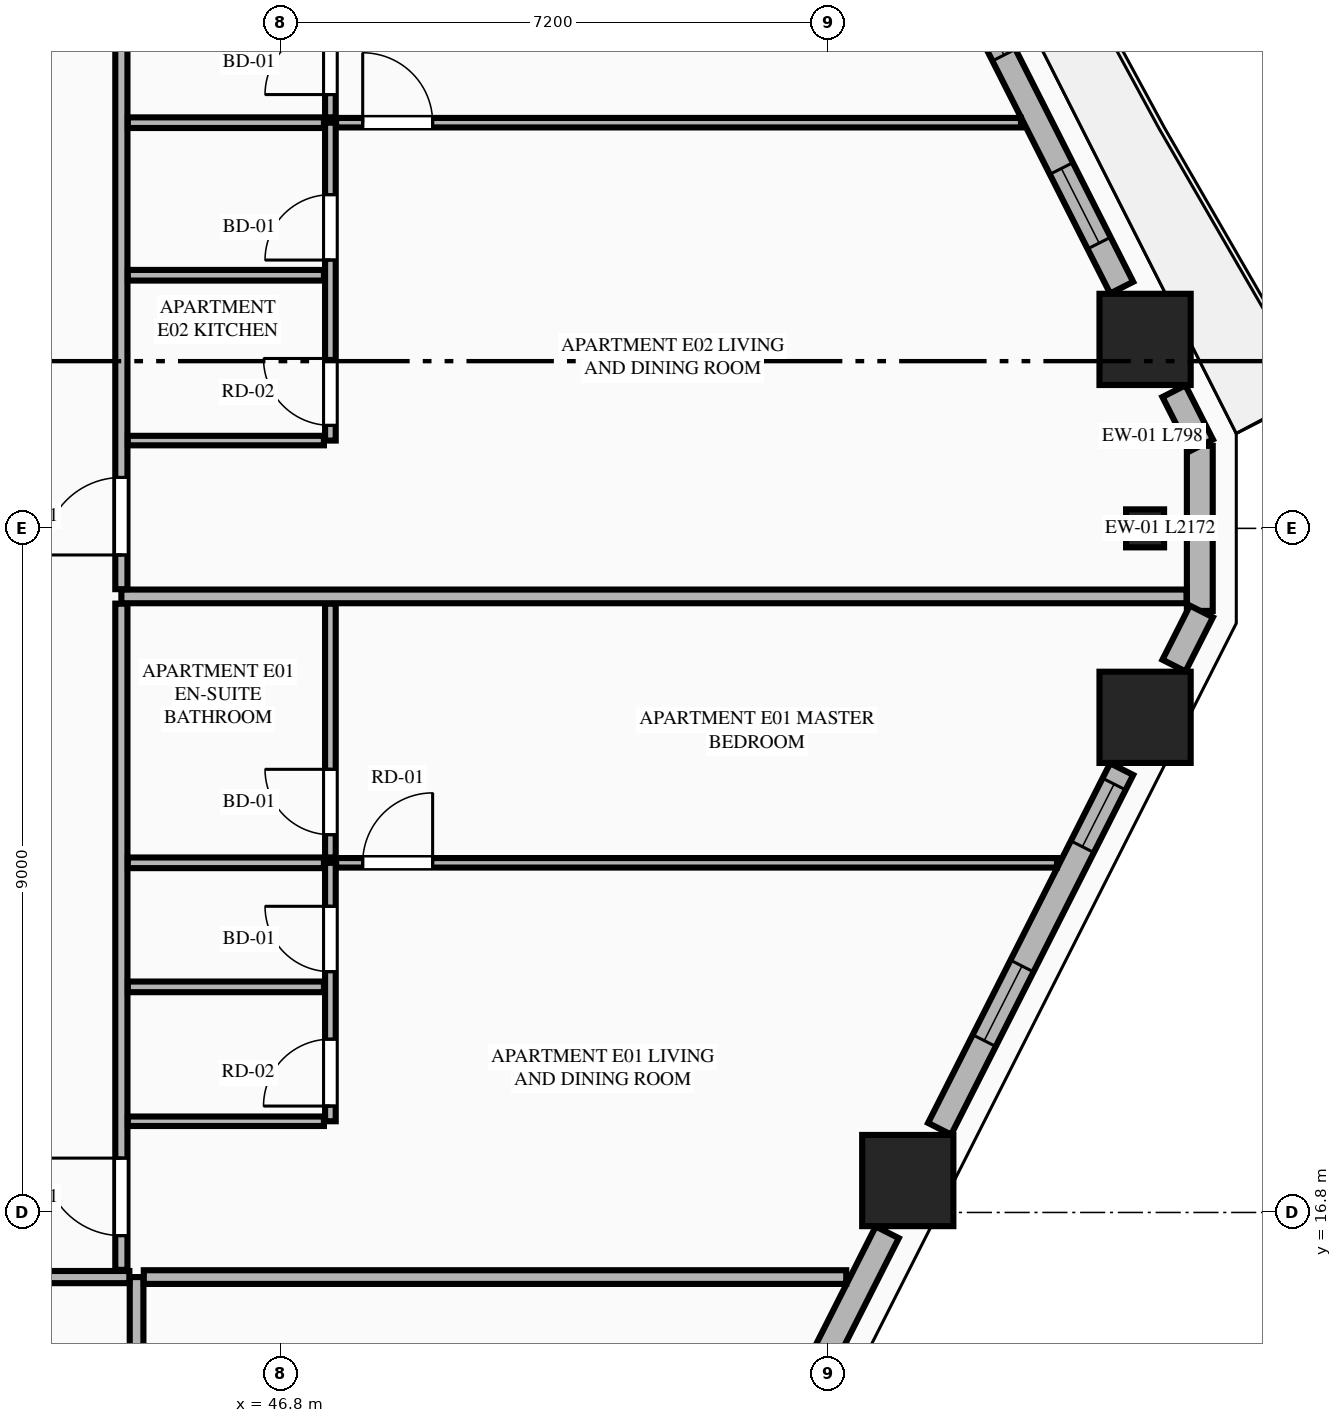
"""IFC4 building model, lengths in metres.
Left out: names, types, materials, properties, quantities, classifications, styles, units other than length and angle.
Written with IfcOpenShell. Run it as: python <this file> out.ifc"""

import sys

from ifc_helpers import new_model, si_unit, direction, frame, frame_2d, origin, origin_2d, place, context, subcontext, project, spatial, rectangle, extrude, element, fill, save


model = new_model("IFC4")
c1 = context("Model", 3, precision=1e-05, world=origin(), true_north=direction((0.0, 1.0)))
c2 = subcontext(c1, "Body", "Model", "MODEL_VIEW")
j1 = project(units=[si_unit("LENGTHUNIT", "METRE"), si_unit("PLANEANGLEUNIT", "RADIAN")], contexts=[c1])
p1 = place(None, origin())
s1 = spatial("IfcSite", under=j1, at=p1, CompositionType="ELEMENT")
p2 = place(p1, origin())
s2 = spatial("IfcBuilding", under=s1, at=p2, CompositionType="ELEMENT")
p3 = place(p2, frame((0.0, 0.0, 67.5)))
s3 = spatial("IfcBuildingStorey", under=s2, at=p3, CompositionType="ELEMENT", Elevation=67.5)
for number, where, z_axis, x_axis in (
    (1, (55.046, 17.22, 0.0), (0.0, 0.0, 1.0), (1.0, 0.0, 0.0)),
    (2, (58.168, 23.314, 0.0), (0.0, 0.0, 1.0), (1.0, 0.0, 0.0)),
    (3, (58.168, 28.286, 0.0), (0.0, 0.0, 1.0), (1.0, 0.0, 0.0)),
):
    element("IfcColumn", number, at=place(p3, frame(where, z_axis=z_axis, x_axis=x_axis)), inside=s3, PredefinedType="COLUMN", context=c2, shape_type="SweptSolid", body=[
        extrude(rectangle(XDim=1.2, YDim=1.2, at=origin_2d()), origin(), (0.0, 0.0, 1.0), 3.55),
    ])
p4 = place(p3, frame((58.168, 25.8, 0.0), z_axis=(0.0, 0.0, 1.0), x_axis=(0.0, 1.0, 0.0)))
e4 = element("IfcColumn", 4, at=p4, inside=s3, PredefinedType="PILASTER", context=c2, shape_type="SweptSolid", body=[
    extrude(rectangle(XDim=0.5, YDim=0.35, at=origin_2d()), origin(), (0.0, 0.0, 1.0), 3.55),
])
p5 = place(p3, frame((58.888, 24.714, 0.0), z_axis=(0.0, 0.0, 1.0), x_axis=(0.0, 1.0, 0.0)))
e5 = element("IfcWall", 5, at=p5, inside=s3, PredefinedType="STANDARD", context=c2, shape_type="SweptSolid", body=[
    extrude(rectangle(XDim=2.172, YDim=0.34, at=frame_2d((1.086, 0.0))), origin(), (0.0, 0.0, 1.0), 3.33),
])
p6 = place(p3, frame((52.271, 11.59, 0.0), z_axis=(0.0, 0.0, 1.0), x_axis=(0.451592100298, 0.892224509273, 0.0)))
e6 = element("IfcWall", 6, at=p6, inside=s3, PredefinedType="STANDARD", context=c2, shape_type="SweptSolid", body=[
    extrude(rectangle(XDim=5.547, YDim=0.34, at=frame_2d((2.773, 0.0))), origin(), (0.0, 0.0, 1.0), 2.787),
])
p7 = place(p6, frame((2.223, 0.0, 0.75)))
e7 = element("IfcOpeningElement", 7, at=p7, cuts=e6, PredefinedType="OPENING", context=c2, shape_type="SweptSolid", body=[
    extrude(rectangle(XDim=1.1, YDim=1.887, at=frame_2d((0.55, 0.943))), frame((0.0, 0.18, 0.0), z_axis=(0.0, -1.0, 0.0), x_axis=(1.0, 0.0, 0.0)), (0.0, 0.0, 1.0), 0.36),
])
p8 = place(p3, frame((55.465, 17.901, 0.0), z_axis=(0.0, 0.0, 1.0), x_axis=(0.451572088722, 0.892234637686, 0.0)))
e8 = element("IfcWall", 8, at=p8, inside=s3, PredefinedType="STANDARD", context=c2, shape_type="SweptSolid", body=[
    extrude(rectangle(XDim=5.304, YDim=0.34, at=frame_2d((2.652, 0.0))), origin(), (0.0, 0.0, 1.0), 2.787),
])
p9 = place(p8, frame((1.3, 0.0, 0.75)))
e9 = element("IfcOpeningElement", 9, at=p9, cuts=e8, PredefinedType="OPENING", context=c2, shape_type="SweptSolid", body=[
    extrude(rectangle(XDim=1.1, YDim=1.887, at=frame_2d((0.55, 0.943))), frame((0.0, 0.18, 0.0), z_axis=(0.0, -1.0, 0.0), x_axis=(1.0, 0.0, 0.0)), (0.0, 0.0, 1.0), 0.36),
])
p10 = place(p8, frame((4.159, 0.0, 0.75)))
e10 = element("IfcOpeningElement", 10, at=p10, cuts=e8, PredefinedType="OPENING", context=c2, shape_type="SweptSolid", body=[
    extrude(rectangle(XDim=0.924, YDim=1.887, at=frame_2d((0.462, 0.943))), frame((0.0, 0.18, 0.0), z_axis=(0.0, -1.0, 0.0), x_axis=(1.0, 0.0, 0.0)), (0.0, 0.0, 1.0), 0.36),
])
for number, where, z_axis, x_axis in (
    (11, (58.548, 23.995, 0.0), (0.0, 0.0, 1.0), (0.452, 0.892, 0.0)),
    (12, (58.909, 26.893, 0.0), (0.0, 0.0, 1.0), (-0.452, 0.892, 0.0)),
):
    element("IfcWall", number, at=place(p3, frame(where, z_axis=z_axis, x_axis=x_axis)), inside=s3, PredefinedType="STANDARD", context=c2, shape_type="SweptSolid", body=[
        extrude(rectangle(XDim=0.798, YDim=0.34, at=frame_2d((0.399, 0.0))), origin(), (0.0, 0.0, 1.0), 3.33),
    ])
p11 = place(p3, frame((57.86, 28.967, 0.0), z_axis=(0.0, 0.0, 1.0), x_axis=(-0.451590635984, 0.892225250422, 0.0)))
e13 = element("IfcWall", 13, at=p11, inside=s3, PredefinedType="STANDARD", context=c2, shape_type="SweptSolid", body=[
    extrude(rectangle(XDim=5.303, YDim=0.34, at=frame_2d((2.652, 0.0))), origin(), (0.0, 0.0, 1.0), 2.787),
])
p12 = place(p11, frame((0.657, 0.0, 0.75)))
e14 = element("IfcOpeningElement", 14, at=p12, cuts=e13, PredefinedType="OPENING", context=c2, shape_type="SweptSolid", body=[
    extrude(rectangle(XDim=1.1, YDim=1.887, at=frame_2d((0.55, 0.943))), frame((0.0, 0.18, 0.0), z_axis=(0.0, -1.0, 0.0), x_axis=(1.0, 0.0, 0.0)), (0.0, 0.0, 1.0), 0.36),
])
p13 = place(p11, frame((3.429, 0.0, 0.75)))
e15 = element("IfcOpeningElement", 15, at=p13, cuts=e13, PredefinedType="OPENING", context=c2, shape_type="SweptSolid", body=[
    extrude(rectangle(XDim=1.1, YDim=1.887, at=frame_2d((0.55, 0.943))), frame((0.0, 0.18, 0.0), z_axis=(0.0, -1.0, 0.0), x_axis=(1.0, 0.0, 0.0)), (0.0, 0.0, 1.0), 0.36),
])
p14 = place(p3, frame((44.9, 2.455, 0.0), z_axis=(0.0, 0.0, 1.0), x_axis=(0.0, 1.0, 0.0)))
e16 = element("IfcWall", 16, at=p14, inside=s3, PredefinedType="PARTITIONING", context=c2, shape_type="SweptSolid", body=[
    extrude(rectangle(XDim=13.495, YDim=0.18, at=frame_2d((6.748, 0.0))), origin(), (0.0, 0.0, 1.0), 3.33),
])
p15 = place(p3, frame((19.995, 15.95, 0.0), z_axis=(0.0, 0.0, 1.0), x_axis=(1.0, 0.0, 0.0)))
e17 = element("IfcWall", 17, at=p15, inside=s3, PredefinedType="PARTITIONING", context=c2, shape_type="SweptSolid", body=[
    extrude(rectangle(XDim=24.81, YDim=0.16, at=frame_2d((12.405, 0.0))), origin(), (0.0, 0.0, 1.0), 3.33),
])
p16 = place(p15, frame((0.705, 0.0, 0.0)))
e18 = element("IfcOpeningElement", 18, at=p16, cuts=e17, PredefinedType="OPENING", context=c2, shape_type="SweptSolid", body=[
    extrude(rectangle(XDim=1.35, YDim=2.35, at=frame_2d((0.675, 1.175))), frame((0.0, 0.09, 0.0), z_axis=(0.0, -1.0, 0.0), x_axis=(1.0, 0.0, 0.0)), (0.0, 0.0, 1.0), 0.18),
])
p17 = place(p3, frame((44.995, 15.95, 0.0), z_axis=(0.0, 0.0, 1.0), x_axis=(1.0, 0.0, 0.0)))
e19 = element("IfcWall", 19, at=p17, inside=s3, PredefinedType="PARTITIONING", context=c2, shape_type="SweptSolid", body=[
    extrude(rectangle(XDim=9.241, YDim=0.18, at=frame_2d((4.621, 0.0))), origin(), (0.0, 0.0, 1.0), 3.33),
])
p18 = place(p3, frame((44.7, 16.045, 0.0), z_axis=(0.0, 0.0, 1.0), x_axis=(0.0, 1.0, 0.0)))
e20 = element("IfcWall", 20, at=p18, inside=s3, PredefinedType="PARTITIONING", context=c2, shape_type="SweptSolid", body=[
    extrude(rectangle(XDim=8.765, YDim=0.16, at=frame_2d((4.383, 0.0))), origin(), (0.0, 0.0, 1.0), 3.33),
])
p19 = place(p18, frame((0.45, 0.0, 0.0)))
e21 = element("IfcOpeningElement", 21, at=p19, cuts=e20, PredefinedType="OPENING", context=c2, shape_type="SweptSolid", body=[
    extrude(rectangle(XDim=1.02, YDim=2.25, at=frame_2d((0.51, 1.125))), frame((0.0, 0.09, 0.0), z_axis=(0.0, -1.0, 0.0), x_axis=(1.0, 0.0, 0.0)), (0.0, 0.0, 1.0), 0.18),
])
p20 = place(p3, frame((44.785, 18.0, 0.0), z_axis=(0.0, 0.0, 1.0), x_axis=(1.0, 0.0, 0.0)))
e22 = element("IfcWall", 22, at=p20, inside=s3, PredefinedType="PARTITIONING", context=c2, shape_type="SweptSolid", body=[
    extrude(rectangle(XDim=2.58, YDim=0.125, at=frame_2d((1.29, 0.0))), origin(), (0.0, 0.0, 1.0), 2.636),
])
p21 = place(p3, frame((47.45, 18.0, 0.0), z_axis=(0.0, 0.0, 1.0), x_axis=(0.0, 1.0, 0.0)))
e23 = element("IfcWall", 23, at=p21, inside=s3, PredefinedType="PLUMBINGWALL", context=c2, shape_type="SweptSolid", body=[
    extrude(rectangle(XDim=3.4, YDim=0.14, at=frame_2d((1.7, 0.0))), origin(), (0.0, 0.0, 1.0), 3.33),
])
p22 = place(p21, frame((0.2, 0.0, 0.0)))
e24 = element("IfcOpeningElement", 24, at=p22, cuts=e23, PredefinedType="OPENING", context=c2, shape_type="SweptSolid", body=[
    extrude(rectangle(XDim=0.88, YDim=2.15, at=frame_2d((0.44, 1.075))), frame((0.0, 0.08, 0.0), z_axis=(0.0, -1.0, 0.0), x_axis=(1.0, 0.0, 0.0)), (0.0, 0.0, 1.0), 0.16),
])
p23 = place(p21, frame((1.968, 0.0, 0.0)))
e25 = element("IfcOpeningElement", 25, at=p23, cuts=e23, PredefinedType="OPENING", context=c2, shape_type="SweptSolid", body=[
    extrude(rectangle(XDim=0.86, YDim=2.1, at=frame_2d((0.43, 1.05))), frame((0.0, 0.08, 0.0), z_axis=(0.0, -1.0, 0.0), x_axis=(1.0, 0.0, 0.0)), (0.0, 0.0, 1.0), 0.16),
])
p24 = place(p3, frame((47.45, 21.47, 0.0), z_axis=(0.0, 0.0, 1.0), x_axis=(0.0, 1.0, 0.0)))
e26 = element("IfcWall", 26, at=p24, inside=s3, PredefinedType="PLUMBINGWALL", context=c2, shape_type="SweptSolid", body=[
    extrude(rectangle(XDim=3.34, YDim=0.14, at=frame_2d((1.67, 0.0))), origin(), (0.0, 0.0, 1.0), 3.33),
])
p25 = place(p24, frame((0.3, 0.0, 0.0)))
e27 = element("IfcOpeningElement", 27, at=p25, cuts=e26, PredefinedType="OPENING", context=c2, shape_type="SweptSolid", body=[
    extrude(rectangle(XDim=0.86, YDim=2.1, at=frame_2d((0.43, 1.05))), frame((0.0, 0.08, 0.0), z_axis=(0.0, -1.0, 0.0), x_axis=(1.0, 0.0, 0.0)), (0.0, 0.0, 1.0), 0.16),
])
p26 = place(p3, frame((44.785, 21.4, 0.0), z_axis=(0.0, 0.0, 1.0), x_axis=(1.0, 0.0, 0.0)))
e28 = element("IfcWall", 28, at=p26, inside=s3, PredefinedType="PLUMBINGWALL", context=c2, shape_type="SweptSolid", body=[
    extrude(rectangle(XDim=2.58, YDim=0.14, at=frame_2d((1.29, 0.0))), origin(), (0.0, 0.0, 1.0), 3.33),
])
p27 = place(p3, frame((47.525, 21.4, 0.0), z_axis=(0.0, 0.0, 1.0), x_axis=(1.0, 0.0, 0.0)))
e29 = element("IfcWall", 29, at=p27, inside=s3, PredefinedType="PARTITIONING", context=c2, shape_type="SweptSolid", body=[
    extrude(rectangle(XDim=9.484, YDim=0.125, at=frame_2d((4.742, 0.0))), origin(), (0.0, 0.0, 1.0), 3.33),
])
p28 = place(p27, frame((0.35, 0.0, 0.0)))
e30 = element("IfcOpeningElement", 30, at=p28, cuts=e29, PredefinedType="OPENING", context=c2, shape_type="SweptSolid", body=[
    extrude(rectangle(XDim=0.92, YDim=2.15, at=frame_2d((0.46, 1.075))), frame((0.0, 0.073, 0.0), z_axis=(0.0, -1.0, 0.0), x_axis=(1.0, 0.0, 0.0)), (0.0, 0.0, 1.0), 0.145),
])
p29 = place(p3, frame((44.785, 19.768, 0.0), z_axis=(0.0, 0.0, 1.0), x_axis=(1.0, 0.0, 0.0)))
e31 = element("IfcWall", 31, at=p29, inside=s3, PredefinedType="PLUMBINGWALL", context=c2, shape_type="SweptSolid", body=[
    extrude(rectangle(XDim=2.58, YDim=0.14, at=frame_2d((1.29, 0.0))), origin(), (0.0, 0.0, 1.0), 3.33),
])
p30 = place(p3, frame((44.7, 24.905, 0.0), z_axis=(0.0, 0.0, 1.0), x_axis=(1.0, 0.0, 0.0)))
e32 = element("IfcWall", 32, at=p30, inside=s3, PredefinedType="PARTITIONING", context=c2, shape_type="SweptSolid", body=[
    extrude(rectangle(XDim=14.013, YDim=0.18, at=frame_2d((7.006, 0.0))), origin(), (0.0, 0.0, 1.0), 3.33),
])
p31 = place(p3, frame((44.7, 25.0, 0.0), z_axis=(0.0, 0.0, 1.0), x_axis=(0.0, 1.0, 0.0)))
e33 = element("IfcWall", 33, at=p31, inside=s3, PredefinedType="PARTITIONING", context=c2, shape_type="SweptSolid", body=[
    extrude(rectangle(XDim=10.755, YDim=0.16, at=frame_2d((5.377, 0.0))), origin(), (0.0, 0.0, 1.0), 3.33),
])
p32 = place(p31, frame((0.45, 0.0, 0.0)))
e34 = element("IfcOpeningElement", 34, at=p32, cuts=e33, PredefinedType="OPENING", context=c2, shape_type="SweptSolid", body=[
    extrude(rectangle(XDim=1.02, YDim=2.25, at=frame_2d((0.51, 1.125))), frame((0.0, 0.09, 0.0), z_axis=(0.0, -1.0, 0.0), x_axis=(1.0, 0.0, 0.0)), (0.0, 0.0, 1.0), 0.18),
])
p33 = place(p3, frame((44.785, 26.955, 0.0), z_axis=(0.0, 0.0, 1.0), x_axis=(1.0, 0.0, 0.0)))
e35 = element("IfcWall", 35, at=p33, inside=s3, PredefinedType="PARTITIONING", context=c2, shape_type="SweptSolid", body=[
    extrude(rectangle(XDim=2.58, YDim=0.125, at=frame_2d((1.29, 0.0))), origin(), (0.0, 0.0, 1.0), 3.33),
])
p34 = place(p3, frame((47.45, 26.955, 0.0), z_axis=(0.0, 0.0, 1.0), x_axis=(0.0, 1.0, 0.0)))
e36 = element("IfcWall", 36, at=p34, inside=s3, PredefinedType="PLUMBINGWALL", context=c2, shape_type="SweptSolid", body=[
    extrude(rectangle(XDim=4.182, YDim=0.14, at=frame_2d((2.091, 0.0))), origin(), (0.0, 0.0, 1.0), 3.33),
])
p35 = place(p34, frame((0.2, 0.0, 0.0)))
e37 = element("IfcOpeningElement", 37, at=p35, cuts=e36, PredefinedType="OPENING", context=c2, shape_type="SweptSolid", body=[
    extrude(rectangle(XDim=0.88, YDim=2.15, at=frame_2d((0.44, 1.075))), frame((0.0, 0.08, 0.0), z_axis=(0.0, -1.0, 0.0), x_axis=(1.0, 0.0, 0.0)), (0.0, 0.0, 1.0), 0.16),
])
p36 = place(p34, frame((2.375, 0.0, 0.0)))
e38 = element("IfcOpeningElement", 38, at=p36, cuts=e36, PredefinedType="OPENING", context=c2, shape_type="SweptSolid", body=[
    extrude(rectangle(XDim=0.86, YDim=2.1, at=frame_2d((0.43, 1.05))), frame((0.0, 0.08, 0.0), z_axis=(0.0, -1.0, 0.0), x_axis=(1.0, 0.0, 0.0)), (0.0, 0.0, 1.0), 0.16),
])
p37 = place(p3, frame((47.45, 31.207, 0.0), z_axis=(0.0, 0.0, 1.0), x_axis=(0.0, 1.0, 0.0)))
e39 = element("IfcWall", 39, at=p37, inside=s3, PredefinedType="PLUMBINGWALL", context=c2, shape_type="SweptSolid", body=[
    extrude(rectangle(XDim=4.548, YDim=0.14, at=frame_2d((2.274, 0.0))), origin(), (0.0, 0.0, 1.0), 3.33),
])
p38 = place(p37, frame((0.3, 0.0, 0.0)))
e40 = element("IfcOpeningElement", 40, at=p38, cuts=e39, PredefinedType="OPENING", context=c2, shape_type="SweptSolid", body=[
    extrude(rectangle(XDim=0.86, YDim=2.1, at=frame_2d((0.43, 1.05))), frame((0.0, 0.08, 0.0), z_axis=(0.0, -1.0, 0.0), x_axis=(1.0, 0.0, 0.0)), (0.0, 0.0, 1.0), 0.16),
])
p39 = place(p3, frame((44.785, 31.137, 0.0), z_axis=(0.0, 0.0, 1.0), x_axis=(1.0, 0.0, 0.0)))
e41 = element("IfcWall", 41, at=p39, inside=s3, PredefinedType="PLUMBINGWALL", context=c2, shape_type="SweptSolid", body=[
    extrude(rectangle(XDim=2.58, YDim=0.14, at=frame_2d((1.29, 0.0))), origin(), (0.0, 0.0, 1.0), 3.33),
])
p40 = place(p3, frame((47.525, 31.137, 0.0), z_axis=(0.0, 0.0, 1.0), x_axis=(1.0, 0.0, 0.0)))
e42 = element("IfcWall", 42, at=p40, inside=s3, PredefinedType="PARTITIONING", context=c2, shape_type="SweptSolid", body=[
    extrude(rectangle(XDim=9.01, YDim=0.125, at=frame_2d((4.505, 0.0))), origin(), (0.0, 0.0, 1.0), 3.33),
])
p41 = place(p40, frame((0.35, 0.0, 0.0)))
e43 = element("IfcOpeningElement", 43, at=p41, cuts=e42, PredefinedType="OPENING", context=c2, shape_type="SweptSolid", body=[
    extrude(rectangle(XDim=0.92, YDim=2.15, at=frame_2d((0.46, 1.075))), frame((0.0, 0.073, 0.0), z_axis=(0.0, -1.0, 0.0), x_axis=(1.0, 0.0, 0.0)), (0.0, 0.0, 1.0), 0.145),
])
p42 = place(p3, frame((44.785, 29.13, 0.0), z_axis=(0.0, 0.0, 1.0), x_axis=(1.0, 0.0, 0.0)))
e44 = element("IfcWall", 44, at=p42, inside=s3, PredefinedType="PLUMBINGWALL", context=c2, shape_type="SweptSolid", body=[
    extrude(rectangle(XDim=2.58, YDim=0.14, at=frame_2d((1.29, 0.0))), origin(), (0.0, 0.0, 1.0), 3.33),
])
p43 = place(p9, origin())
e45 = element("IfcWindow", 45, at=p43, inside=s3, PartitioningType="SINGLE_PANEL", PredefinedType="WINDOW", context=c2, shape_type="SweptSolid", body=[
    extrude(rectangle(XDim=1.1, YDim=1.887, at=frame_2d((0.55, 0.943))), frame((0.0, 0.03, 0.0), z_axis=(0.0, -1.0, 0.0), x_axis=(1.0, 0.0, 0.0)), (0.0, 0.0, 1.0), 0.06),
])
fill(e9, e45)
p44 = place(p12, origin())
e46 = element("IfcWindow", 46, at=p44, inside=s3, PartitioningType="SINGLE_PANEL", PredefinedType="WINDOW", context=c2, shape_type="SweptSolid", body=[
    extrude(rectangle(XDim=1.1, YDim=1.887, at=frame_2d((0.55, 0.943))), frame((0.0, 0.03, 0.0), z_axis=(0.0, -1.0, 0.0), x_axis=(1.0, 0.0, 0.0)), (0.0, 0.0, 1.0), 0.06),
])
fill(e14, e46)
p45 = place(p22, origin())
e47 = element("IfcDoor", 47, at=p45, inside=s3, OperationType="SINGLE_SWING_LEFT", PredefinedType="DOOR", context=c2, shape_type="SweptSolid", body=[
    extrude(rectangle(XDim=0.88, YDim=2.15, at=frame_2d((0.44, 1.075))), frame((0.0, 0.025, 0.0), z_axis=(0.0, -1.0, 0.0), x_axis=(1.0, 0.0, 0.0)), (0.0, 0.0, 1.0), 0.05),
])
fill(e24, e47)
p46 = place(p23, origin())
e48 = element("IfcDoor", 48, at=p46, inside=s3, OperationType="SINGLE_SWING_RIGHT", PredefinedType="DOOR", context=c2, shape_type="SweptSolid", body=[
    extrude(rectangle(XDim=0.86, YDim=2.1, at=frame_2d((0.43, 1.05))), frame((0.0, 0.025, 0.0), z_axis=(0.0, -1.0, 0.0), x_axis=(1.0, 0.0, 0.0)), (0.0, 0.0, 1.0), 0.05),
])
fill(e25, e48)
p47 = place(p25, origin())
e49 = element("IfcDoor", 49, at=p47, inside=s3, OperationType="SINGLE_SWING_RIGHT", PredefinedType="DOOR", context=c2, shape_type="SweptSolid", body=[
    extrude(rectangle(XDim=0.86, YDim=2.1, at=frame_2d((0.43, 1.05))), frame((0.0, 0.025, 0.0), z_axis=(0.0, -1.0, 0.0), x_axis=(1.0, 0.0, 0.0)), (0.0, 0.0, 1.0), 0.05),
])
fill(e27, e49)
p48 = place(p19, origin())
e50 = element("IfcDoor", 50, at=p48, inside=s3, OperationType="SINGLE_SWING_RIGHT", PredefinedType="DOOR", context=c2, shape_type="SweptSolid", body=[
    extrude(rectangle(XDim=1.02, YDim=2.25, at=frame_2d((0.51, 1.125))), frame((0.0, 0.025, 0.0), z_axis=(0.0, -1.0, 0.0), x_axis=(1.0, 0.0, 0.0)), (0.0, 0.0, 1.0), 0.05),
])
fill(e21, e50)
p49 = place(p28, origin())
e51 = element("IfcDoor", 51, at=p49, inside=s3, OperationType="SINGLE_SWING_RIGHT", PredefinedType="DOOR", context=c2, shape_type="SweptSolid", body=[
    extrude(rectangle(XDim=0.92, YDim=2.15, at=frame_2d((0.46, 1.075))), frame((0.0, 0.025, 0.0), z_axis=(0.0, -1.0, 0.0), x_axis=(1.0, 0.0, 0.0)), (0.0, 0.0, 1.0), 0.05),
])
fill(e30, e51)
p50 = place(p35, origin())
e52 = element("IfcDoor", 52, at=p50, inside=s3, OperationType="SINGLE_SWING_RIGHT", PredefinedType="DOOR", context=c2, shape_type="SweptSolid", body=[
    extrude(rectangle(XDim=0.88, YDim=2.15, at=frame_2d((0.44, 1.075))), frame((0.0, 0.025, 0.0), z_axis=(0.0, -1.0, 0.0), x_axis=(1.0, 0.0, 0.0)), (0.0, 0.0, 1.0), 0.05),
])
fill(e37, e52)
p51 = place(p36, origin())
e53 = element("IfcDoor", 53, at=p51, inside=s3, OperationType="SINGLE_SWING_LEFT", PredefinedType="DOOR", context=c2, shape_type="SweptSolid", body=[
    extrude(rectangle(XDim=0.86, YDim=2.1, at=frame_2d((0.43, 1.05))), frame((0.0, 0.025, 0.0), z_axis=(0.0, -1.0, 0.0), x_axis=(1.0, 0.0, 0.0)), (0.0, 0.0, 1.0), 0.05),
])
fill(e38, e53)
p52 = place(p38, origin())
e54 = element("IfcDoor", 54, at=p52, inside=s3, OperationType="SINGLE_SWING_LEFT", PredefinedType="DOOR", context=c2, shape_type="SweptSolid", body=[
    extrude(rectangle(XDim=0.86, YDim=2.1, at=frame_2d((0.43, 1.05))), frame((0.0, 0.025, 0.0), z_axis=(0.0, -1.0, 0.0), x_axis=(1.0, 0.0, 0.0)), (0.0, 0.0, 1.0), 0.05),
])
fill(e40, e54)
p53 = place(p32, origin())
e55 = element("IfcDoor", 55, at=p53, inside=s3, OperationType="SINGLE_SWING_LEFT", PredefinedType="DOOR", context=c2, shape_type="SweptSolid", body=[
    extrude(rectangle(XDim=1.02, YDim=2.25, at=frame_2d((0.51, 1.125))), frame((0.0, 0.025, 0.0), z_axis=(0.0, -1.0, 0.0), x_axis=(1.0, 0.0, 0.0)), (0.0, 0.0, 1.0), 0.05),
])
fill(e34, e55)
p54 = place(p41, origin())
e56 = element("IfcDoor", 56, at=p54, inside=s3, OperationType="SINGLE_SWING_LEFT", PredefinedType="DOOR", context=c2, shape_type="SweptSolid", body=[
    extrude(rectangle(XDim=0.92, YDim=2.15, at=frame_2d((0.46, 1.075))), frame((0.0, 0.025, 0.0), z_axis=(0.0, -1.0, 0.0), x_axis=(1.0, 0.0, 0.0)), (0.0, 0.0, 1.0), 0.05),
])
fill(e43, e56)
p55 = place(p10, origin())
e57 = element("IfcWindow", 57, at=p55, inside=s3, PartitioningType="SINGLE_PANEL", PredefinedType="WINDOW", context=c2, shape_type="SweptSolid", body=[
    extrude(rectangle(XDim=0.924, YDim=1.887, at=frame_2d((0.462, 0.943))), frame((0.0, 0.03, 0.0), z_axis=(0.0, -1.0, 0.0), x_axis=(1.0, 0.0, 0.0)), (0.0, 0.0, 1.0), 0.06),
])
fill(e10, e57)
p56 = place(p13, origin())
e58 = element("IfcWindow", 58, at=p56, inside=s3, PartitioningType="SINGLE_PANEL", PredefinedType="WINDOW", context=c2, shape_type="SweptSolid", body=[
    extrude(rectangle(XDim=1.1, YDim=1.887, at=frame_2d((0.55, 0.943))), frame((0.0, 0.03, 0.0), z_axis=(0.0, -1.0, 0.0), x_axis=(1.0, 0.0, 0.0)), (0.0, 0.0, 1.0), 0.06),
])
fill(e15, e58)
save(model, sys.argv[1])
